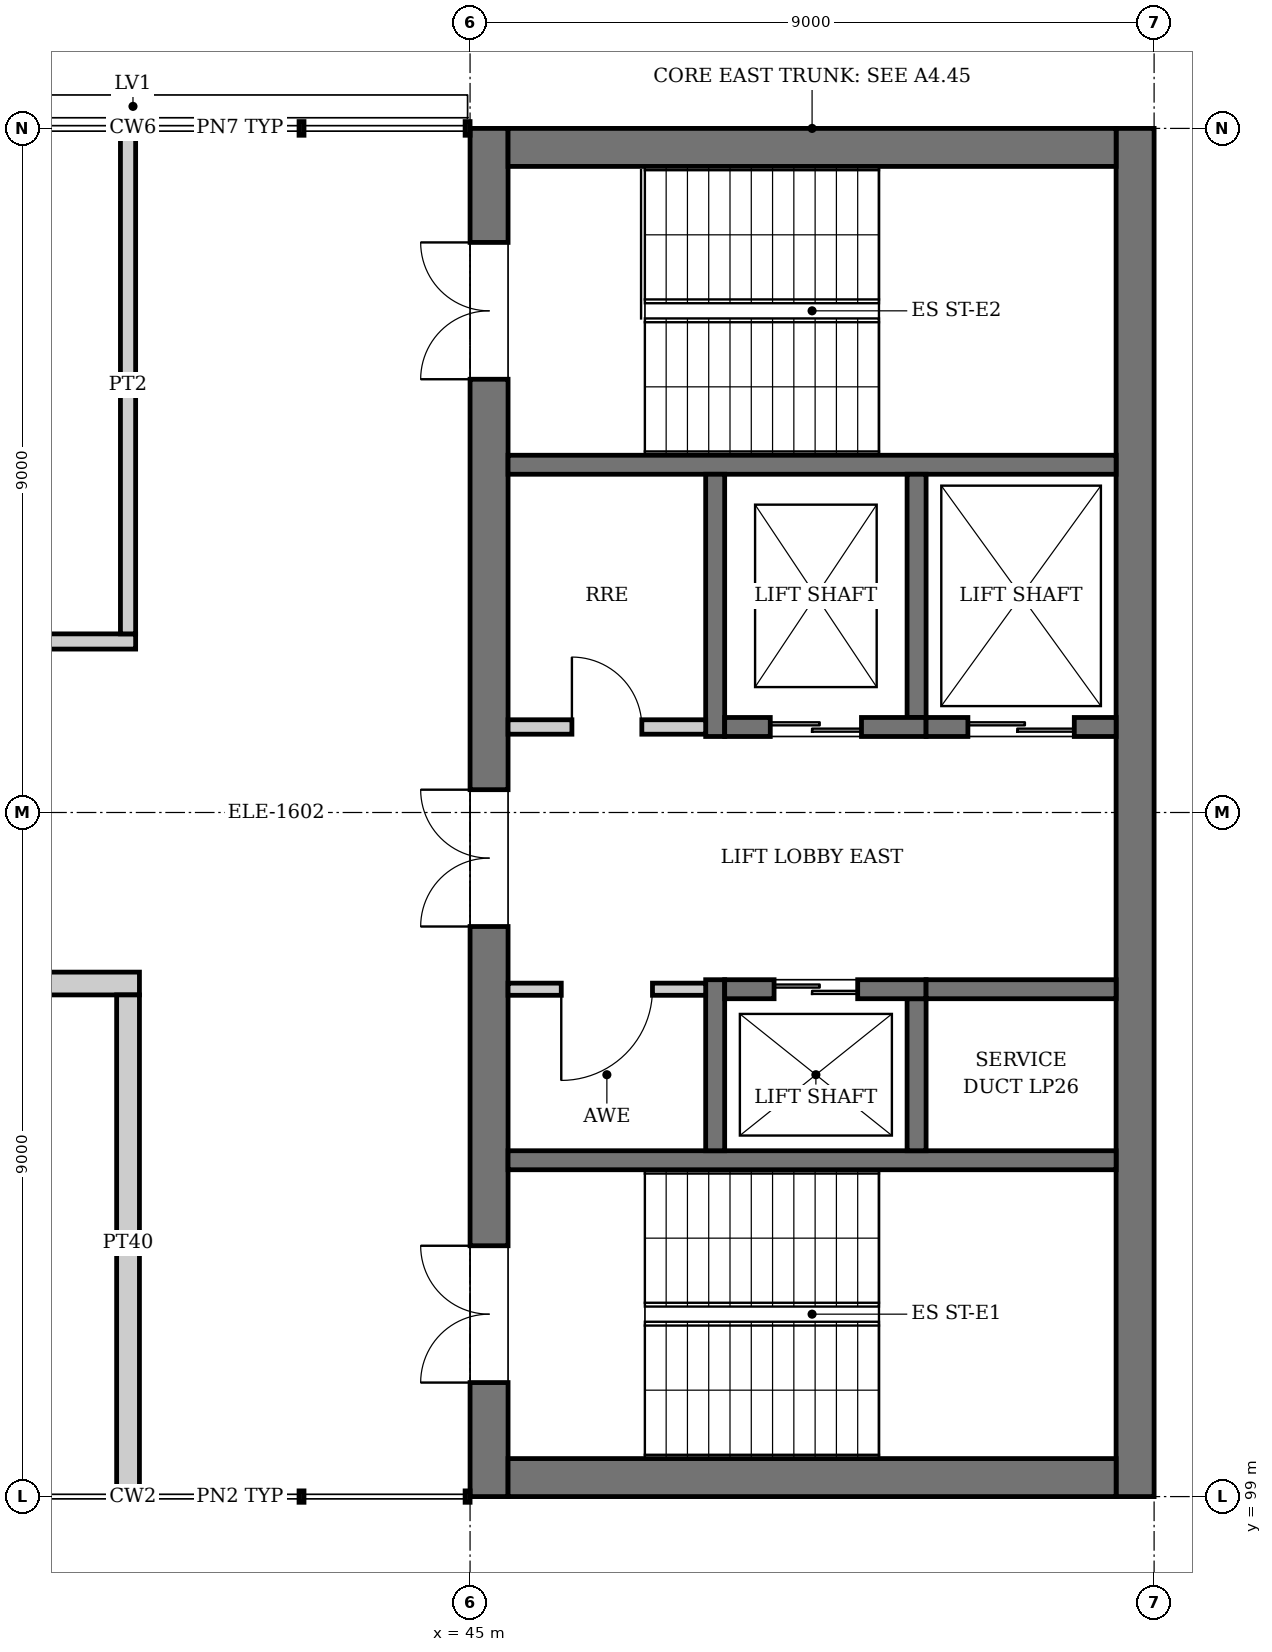
"""IFC4 building model, lengths in metres.
Left out: names, types, materials, properties, quantities, classifications, styles, units other than length and angle.
Written with IfcOpenShell. Run it as: python <this file> out.ifc"""

import sys

from ifc_helpers import new_model, si_unit, direction, frame, frame_2d, origin, place, context, subcontext, project, spatial, rectangle, extrude, element, fill, save


model = new_model("IFC4")
c1 = context("Model", 3, precision=1e-05, world=origin(), true_north=direction((0.0, 1.0)))
c2 = subcontext(c1, "Body", "Model", "MODEL_VIEW")
j1 = project(units=[si_unit("LENGTHUNIT", "METRE"), si_unit("PLANEANGLEUNIT", "RADIAN")], contexts=[c1])
p1 = place(None, origin())
s1 = spatial("IfcSite", under=j1, at=p1, CompositionType="ELEMENT")
p2 = place(p1, origin())
s2 = spatial("IfcBuilding", under=s1, at=p2, CompositionType="ELEMENT")
p3 = place(p2, frame((0.0, 0.0, 67.2)))
s3 = spatial("IfcBuildingStorey", under=s2, at=p3, CompositionType="ELEMENT", Elevation=67.2)
p4 = place(p3, frame((45.25, 99.0, 0.0), z_axis=(0.0, 0.0, 1.0), x_axis=(0.0, 1.0, 0.0)))
e1 = element("IfcWall", 1, at=p4, inside=s3, PredefinedType="SHEAR", context=c2, shape_type="SweptSolid", body=[
    extrude(rectangle(XDim=18.0, YDim=0.5, at=frame_2d((9.0, 0.0))), origin(), (0.0, 0.0, 1.0), 4.0),
])
p5 = place(p4, frame((1.5, 0.0, 0.0)))
e2 = element("IfcOpeningElement", 2, at=p5, cuts=e1, PredefinedType="OPENING", context=c2, shape_type="SweptSolid", body=[
    extrude(rectangle(XDim=1.8, YDim=2.1, at=frame_2d((0.9, 1.05))), frame((0.0, 0.26, 0.0), z_axis=(0.0, -1.0, 0.0), x_axis=(1.0, 0.0, 0.0)), (0.0, 0.0, 1.0), 0.52),
])
p6 = place(p4, frame((14.7, 0.0, 0.0)))
e3 = element("IfcOpeningElement", 3, at=p6, cuts=e1, PredefinedType="OPENING", context=c2, shape_type="SweptSolid", body=[
    extrude(rectangle(XDim=1.8, YDim=2.1, at=frame_2d((0.9, 1.05))), frame((0.0, 0.26, 0.0), z_axis=(0.0, -1.0, 0.0), x_axis=(1.0, 0.0, 0.0)), (0.0, 0.0, 1.0), 0.52),
])
p7 = place(p4, frame((7.5, 0.0, 0.0)))
e4 = element("IfcOpeningElement", 4, at=p7, cuts=e1, PredefinedType="OPENING", context=c2, shape_type="SweptSolid", body=[
    extrude(rectangle(XDim=1.8, YDim=2.1, at=frame_2d((0.9, 1.05))), frame((0.0, 0.26, 0.0), z_axis=(0.0, -1.0, 0.0), x_axis=(1.0, 0.0, 0.0)), (0.0, 0.0, 1.0), 0.52),
])
p8 = place(p3, frame((53.75, 99.0, 0.0), z_axis=(0.0, 0.0, 1.0), x_axis=(0.0, 1.0, 0.0)))
e5 = element("IfcWall", 5, at=p8, inside=s3, PredefinedType="SHEAR", context=c2, shape_type="SweptSolid", body=[
    extrude(rectangle(XDim=18.0, YDim=0.5, at=frame_2d((9.0, 0.0))), origin(), (0.0, 0.0, 1.0), 4.0),
])
for number, where, z_axis, x_axis in (
    (6, (45.5, 99.25, 0.0), (0.0, 0.0, 1.0), (1.0, 0.0, 0.0)),
    (7, (45.5, 116.75, 0.0), (0.0, 0.0, 1.0), (1.0, 0.0, 0.0)),
):
    element("IfcWall", number, at=place(p3, frame(where, z_axis=z_axis, x_axis=x_axis)), inside=s3, PredefinedType="SHEAR", context=c2, shape_type="SweptSolid", body=[
        extrude(rectangle(XDim=8.0, YDim=0.5, at=frame_2d((4.0, 0.0))), origin(), (0.0, 0.0, 1.0), 4.0),
    ])
for number, where, z_axis, x_axis in (
    (8, (45.5, 103.425, 0.0), (0.0, 0.0, 1.0), (1.0, 0.0, 0.0)),
    (9, (45.5, 112.575, 0.0), (0.0, 0.0, 1.0), (1.0, 0.0, 0.0)),
):
    element("IfcWall", number, at=place(p3, frame(where, z_axis=z_axis, x_axis=x_axis)), inside=s3, PredefinedType="SOLIDWALL", context=c2, shape_type="SweptSolid", body=[
        extrude(rectangle(XDim=8.0, YDim=0.25, at=frame_2d((4.0, 0.0))), origin(), (0.0, 0.0, 1.0), 3.75),
    ])
p9 = place(p3, frame((48.225, 103.55, 0.0), z_axis=(0.0, 0.0, 1.0), x_axis=(0.0, 1.0, 0.0)))
e10 = element("IfcWall", 10, at=p9, inside=s3, PredefinedType="SOLIDWALL", context=c2, shape_type="SweptSolid", body=[
    extrude(rectangle(XDim=2.25, YDim=0.25, at=frame_2d((1.125, 0.0))), origin(), (0.0, 0.0, 1.0), 4.0),
])
p10 = place(p3, frame((50.875, 103.55, 0.0), z_axis=(0.0, 0.0, 1.0), x_axis=(0.0, 1.0, 0.0)))
e11 = element("IfcWall", 11, at=p10, inside=s3, PredefinedType="SOLIDWALL", context=c2, shape_type="SweptSolid", body=[
    extrude(rectangle(XDim=2.0, YDim=0.25, at=frame_2d((1.0, 0.0))), origin(), (0.0, 0.0, 1.0), 4.0),
])
p11 = place(p3, frame((48.35, 105.675, 0.0), z_axis=(0.0, 0.0, 1.0), x_axis=(1.0, 0.0, 0.0)))
e12 = element("IfcWall", 12, at=p11, inside=s3, PredefinedType="SOLIDWALL", context=c2, shape_type="SweptSolid", body=[
    extrude(rectangle(XDim=2.65, YDim=0.25, at=frame_2d((1.325, 0.0))), origin(), (0.0, 0.0, 1.0), 4.0),
])
p12 = place(p11, frame((0.65, 0.0, 0.0)))
e13 = element("IfcOpeningElement", 13, at=p12, cuts=e12, PredefinedType="OPENING", context=c2, shape_type="SweptSolid", body=[
    extrude(rectangle(XDim=1.1, YDim=2.1, at=frame_2d((0.55, 1.05))), frame((0.0, 0.135, 0.0), z_axis=(0.0, -1.0, 0.0), x_axis=(1.0, 0.0, 0.0)), (0.0, 0.0, 1.0), 0.27),
])
p13 = place(p3, frame((51.0, 105.675, 0.0), z_axis=(0.0, 0.0, 1.0), x_axis=(1.0, 0.0, 0.0)))
e14 = element("IfcWall", 14, at=p13, inside=s3, PredefinedType="SOLIDWALL", context=c2, shape_type="SweptSolid", body=[
    extrude(rectangle(XDim=2.5, YDim=0.25, at=frame_2d((1.25, 0.0))), origin(), (0.0, 0.0, 1.0), 4.0),
])
p14 = place(p3, frame((48.225, 109.0, 0.0), z_axis=(0.0, 0.0, 1.0), x_axis=(0.0, 1.0, 0.0)))
e15 = element("IfcWall", 15, at=p14, inside=s3, PredefinedType="SOLIDWALL", context=c2, shape_type="SweptSolid", body=[
    extrude(rectangle(XDim=3.45, YDim=0.25, at=frame_2d((1.725, 0.0))), origin(), (0.0, 0.0, 1.0), 4.0),
])
p15 = place(p3, frame((50.875, 109.25, 0.0), z_axis=(0.0, 0.0, 1.0), x_axis=(0.0, 1.0, 0.0)))
e16 = element("IfcWall", 16, at=p15, inside=s3, PredefinedType="SOLIDWALL", context=c2, shape_type="SweptSolid", body=[
    extrude(rectangle(XDim=3.2, YDim=0.25, at=frame_2d((1.6, 0.0))), origin(), (0.0, 0.0, 1.0), 4.0),
])
p16 = place(p3, frame((48.35, 109.125, 0.0), z_axis=(0.0, 0.0, 1.0), x_axis=(1.0, 0.0, 0.0)))
e17 = element("IfcWall", 17, at=p16, inside=s3, PredefinedType="SOLIDWALL", context=c2, shape_type="SweptSolid", body=[
    extrude(rectangle(XDim=2.65, YDim=0.25, at=frame_2d((1.325, 0.0))), origin(), (0.0, 0.0, 1.0), 4.0),
])
p17 = place(p16, frame((0.6, 0.0, 0.0)))
e18 = element("IfcOpeningElement", 18, at=p17, cuts=e17, PredefinedType="OPENING", context=c2, shape_type="SweptSolid", body=[
    extrude(rectangle(XDim=1.2, YDim=2.1, at=frame_2d((0.6, 1.05))), frame((0.0, 0.135, 0.0), z_axis=(0.0, -1.0, 0.0), x_axis=(1.0, 0.0, 0.0)), (0.0, 0.0, 1.0), 0.27),
])
p18 = place(p3, frame((51.0, 109.125, 0.0), z_axis=(0.0, 0.0, 1.0), x_axis=(1.0, 0.0, 0.0)))
e19 = element("IfcWall", 19, at=p18, inside=s3, PredefinedType="SOLIDWALL", context=c2, shape_type="SweptSolid", body=[
    extrude(rectangle(XDim=2.5, YDim=0.25, at=frame_2d((1.25, 0.0))), origin(), (0.0, 0.0, 1.0), 4.0),
])
p19 = place(p18, frame((0.55, 0.0, 0.0)))
e20 = element("IfcOpeningElement", 20, at=p19, cuts=e19, PredefinedType="OPENING", context=c2, shape_type="SweptSolid", body=[
    extrude(rectangle(XDim=1.4, YDim=2.4, at=frame_2d((0.7, 1.2))), frame((0.0, 0.135, 0.0), z_axis=(0.0, -1.0, 0.0), x_axis=(1.0, 0.0, 0.0)), (0.0, 0.0, 1.0), 0.27),
])
p20 = place(p3, frame((45.5, 105.675, 0.0), z_axis=(0.0, 0.0, 1.0), x_axis=(1.0, 0.0, 0.0)))
e21 = element("IfcWall", 21, at=p20, inside=s3, PredefinedType="PARTITIONING", context=c2, shape_type="SweptSolid", body=[
    extrude(rectangle(XDim=2.6, YDim=0.16, at=frame_2d((1.3, 0.0))), origin(), (0.0, 0.0, 1.0), 3.75),
])
p21 = place(p20, frame((0.7, 0.0, 0.0)))
e22 = element("IfcOpeningElement", 22, at=p21, cuts=e21, PredefinedType="OPENING", context=c2, shape_type="SweptSolid", body=[
    extrude(rectangle(XDim=1.2, YDim=2.1, at=frame_2d((0.6, 1.05))), frame((0.0, 0.09, 0.0), z_axis=(0.0, -1.0, 0.0), x_axis=(1.0, 0.0, 0.0)), (0.0, 0.0, 1.0), 0.18),
])
p22 = place(p3, frame((45.5, 109.125, 0.0), z_axis=(0.0, 0.0, 1.0), x_axis=(1.0, 0.0, 0.0)))
e23 = element("IfcWall", 23, at=p22, inside=s3, PredefinedType="PARTITIONING", context=c2, shape_type="SweptSolid", body=[
    extrude(rectangle(XDim=2.6, YDim=0.19, at=frame_2d((1.3, 0.0))), origin(), (0.0, 0.0, 1.0), 3.75),
])
p23 = place(p22, frame((0.84, 0.0, 0.0)))
e24 = element("IfcOpeningElement", 24, at=p23, cuts=e23, PredefinedType="OPENING", context=c2, shape_type="SweptSolid", body=[
    extrude(rectangle(XDim=0.92, YDim=2.1, at=frame_2d((0.46, 1.05))), frame((0.0, 0.105, 0.0), z_axis=(0.0, -1.0, 0.0), x_axis=(1.0, 0.0, 0.0)), (0.0, 0.0, 1.0), 0.21),
])
p24 = place(p3, frame((22.35, 105.75, 0.0), z_axis=(0.0, 0.0, 1.0), x_axis=(1.0, 0.0, 0.0)))
e25 = element("IfcWall", 25, at=p24, inside=s3, PredefinedType="PARTITIONING", context=c2, shape_type="SweptSolid", body=[
    extrude(rectangle(XDim=18.3, YDim=0.3, at=frame_2d((9.15, 0.0))), origin(), (0.0, 0.0, 1.0), 2.9),
])
p25 = place(p24, frame((3.7, 0.0, 0.0)))
e26 = element("IfcOpeningElement", 26, at=p25, cuts=e25, PredefinedType="OPENING", context=c2, shape_type="SweptSolid", body=[
    extrude(rectangle(XDim=1.9, YDim=2.4, at=frame_2d((0.95, 1.2))), frame((0.0, 0.16, 0.0), z_axis=(0.0, -1.0, 0.0), x_axis=(1.0, 0.0, 0.0)), (0.0, 0.0, 1.0), 0.32),
])
p26 = place(p24, frame((12.7, 0.0, 0.0)))
e27 = element("IfcOpeningElement", 27, at=p26, cuts=e25, PredefinedType="OPENING", context=c2, shape_type="SweptSolid", body=[
    extrude(rectangle(XDim=1.9, YDim=2.4, at=frame_2d((0.95, 1.2))), frame((0.0, 0.16, 0.0), z_axis=(0.0, -1.0, 0.0), x_axis=(1.0, 0.0, 0.0)), (0.0, 0.0, 1.0), 0.32),
])
p27 = place(p3, frame((13.4, 110.25, 0.0), z_axis=(0.0, 0.0, 1.0), x_axis=(1.0, 0.0, 0.0)))
e28 = element("IfcWall", 28, at=p27, inside=s3, PredefinedType="PARTITIONING", context=c2, shape_type="SweptSolid", body=[
    extrude(rectangle(XDim=27.2, YDim=0.2, at=frame_2d((13.6, 0.0))), origin(), (0.0, 0.0, 1.0), 2.9),
])
p28 = place(p27, frame((4.05, 0.0, 0.0)))
e29 = element("IfcOpeningElement", 29, at=p28, cuts=e28, PredefinedType="OPENING", context=c2, shape_type="SweptSolid", body=[
    extrude(rectangle(XDim=1.1, YDim=2.4, at=frame_2d((0.55, 1.2))), frame((0.0, 0.11, 0.0), z_axis=(0.0, -1.0, 0.0), x_axis=(1.0, 0.0, 0.0)), (0.0, 0.0, 1.0), 0.22),
])
p29 = place(p27, frame((12.7, 0.0, 0.0)))
e30 = element("IfcOpeningElement", 30, at=p29, cuts=e28, PredefinedType="OPENING", context=c2, shape_type="SweptSolid", body=[
    extrude(rectangle(XDim=1.8, YDim=2.1, at=frame_2d((0.9, 1.05))), frame((0.0, 0.11, 0.0), z_axis=(0.0, -1.0, 0.0), x_axis=(1.0, 0.0, 0.0)), (0.0, 0.0, 1.0), 0.22),
])
p30 = place(p27, frame((21.7, 0.0, 0.0)))
e31 = element("IfcOpeningElement", 31, at=p30, cuts=e28, PredefinedType="OPENING", context=c2, shape_type="SweptSolid", body=[
    extrude(rectangle(XDim=1.8, YDim=2.1, at=frame_2d((0.9, 1.05))), frame((0.0, 0.11, 0.0), z_axis=(0.0, -1.0, 0.0), x_axis=(1.0, 0.0, 0.0)), (0.0, 0.0, 1.0), 0.22),
])
p31 = place(p3, frame((40.5, 99.075, 0.0), z_axis=(0.0, 0.0, 1.0), x_axis=(0.0, 1.0, 0.0)))
e32 = element("IfcWall", 32, at=p31, inside=s3, PredefinedType="PARTITIONING", context=c2, shape_type="SweptSolid", body=[
    extrude(rectangle(XDim=6.525, YDim=0.3, at=frame_2d((3.263, 0.0))), origin(), (0.0, 0.0, 1.0), 2.9),
])
p32 = place(p3, frame((40.5, 110.35, 0.0), z_axis=(0.0, 0.0, 1.0), x_axis=(0.0, 1.0, 0.0)))
e33 = element("IfcWall", 33, at=p32, inside=s3, PredefinedType="PARTITIONING", context=c2, shape_type="SweptSolid", body=[
    extrude(rectangle(XDim=6.56, YDim=0.2, at=frame_2d((3.28, 0.0))), origin(), (0.0, 0.0, 1.0), 2.9),
])
p33 = place(p12, origin())
e34 = element("IfcDoor", 34, at=p33, inside=s3, OperationType="DOUBLE_DOOR_SLIDING", PredefinedType="DOOR", context=c2, shape_type="SweptSolid", body=[
    extrude(rectangle(XDim=1.1, YDim=2.1, at=frame_2d((0.55, 1.05))), frame((0.0, 0.025, 0.0), z_axis=(0.0, -1.0, 0.0), x_axis=(1.0, 0.0, 0.0)), (0.0, 0.0, 1.0), 0.05),
])
fill(e13, e34)
p34 = place(p17, origin())
e35 = element("IfcDoor", 35, at=p34, inside=s3, OperationType="DOUBLE_DOOR_SLIDING", PredefinedType="DOOR", context=c2, shape_type="SweptSolid", body=[
    extrude(rectangle(XDim=1.2, YDim=2.1, at=frame_2d((0.6, 1.05))), frame((0.0, 0.025, 0.0), z_axis=(0.0, -1.0, 0.0), x_axis=(1.0, 0.0, 0.0)), (0.0, 0.0, 1.0), 0.05),
])
fill(e18, e35)
p35 = place(p19, origin())
e36 = element("IfcDoor", 36, at=p35, inside=s3, OperationType="DOUBLE_DOOR_SLIDING", PredefinedType="DOOR", context=c2, shape_type="SweptSolid", body=[
    extrude(rectangle(XDim=1.4, YDim=2.4, at=frame_2d((0.7, 1.2))), frame((0.0, 0.025, 0.0), z_axis=(0.0, -1.0, 0.0), x_axis=(1.0, 0.0, 0.0)), (0.0, 0.0, 1.0), 0.05),
])
fill(e20, e36)
p36 = place(p5, origin())
e37 = element("IfcDoor", 37, at=p36, inside=s3, OperationType="DOUBLE_DOOR_SINGLE_SWING", PredefinedType="DOOR", context=c2, shape_type="SweptSolid", body=[
    extrude(rectangle(XDim=1.8, YDim=2.1, at=frame_2d((0.9, 1.05))), frame((0.0, 0.025, 0.0), z_axis=(0.0, -1.0, 0.0), x_axis=(1.0, 0.0, 0.0)), (0.0, 0.0, 1.0), 0.05),
])
fill(e2, e37)
p37 = place(p6, origin())
e38 = element("IfcDoor", 38, at=p37, inside=s3, OperationType="DOUBLE_DOOR_SINGLE_SWING", PredefinedType="DOOR", context=c2, shape_type="SweptSolid", body=[
    extrude(rectangle(XDim=1.8, YDim=2.1, at=frame_2d((0.9, 1.05))), frame((0.0, 0.025, 0.0), z_axis=(0.0, -1.0, 0.0), x_axis=(1.0, 0.0, 0.0)), (0.0, 0.0, 1.0), 0.05),
])
fill(e3, e38)
p38 = place(p7, origin())
e39 = element("IfcDoor", 39, at=p38, inside=s3, OperationType="DOUBLE_DOOR_SINGLE_SWING", PredefinedType="DOOR", context=c2, shape_type="SweptSolid", body=[
    extrude(rectangle(XDim=1.8, YDim=2.1, at=frame_2d((0.9, 1.05))), frame((0.0, 0.025, 0.0), z_axis=(0.0, -1.0, 0.0), x_axis=(1.0, 0.0, 0.0)), (0.0, 0.0, 1.0), 0.05),
])
fill(e4, e39)
p39 = place(p21, frame((1.2, 0.0, 0.0), z_axis=(0.0, 0.0, 1.0), x_axis=(-1.0, 0.0, 0.0)))
e40 = element("IfcDoor", 40, at=p39, inside=s3, OperationType="SINGLE_SWING_RIGHT", PredefinedType="DOOR", context=c2, shape_type="SweptSolid", body=[
    extrude(rectangle(XDim=1.2, YDim=2.1, at=frame_2d((0.6, 1.05))), frame((0.0, 0.025, 0.0), z_axis=(0.0, -1.0, 0.0), x_axis=(1.0, 0.0, 0.0)), (0.0, 0.0, 1.0), 0.05),
])
fill(e22, e40)
p40 = place(p23, origin())
e41 = element("IfcDoor", 41, at=p40, inside=s3, OperationType="SINGLE_SWING_LEFT", PredefinedType="DOOR", context=c2, shape_type="SweptSolid", body=[
    extrude(rectangle(XDim=0.92, YDim=2.1, at=frame_2d((0.46, 1.05))), frame((0.0, 0.025, 0.0), z_axis=(0.0, -1.0, 0.0), x_axis=(1.0, 0.0, 0.0)), (0.0, 0.0, 1.0), 0.05),
])
fill(e24, e41)
save(model, sys.argv[1])
